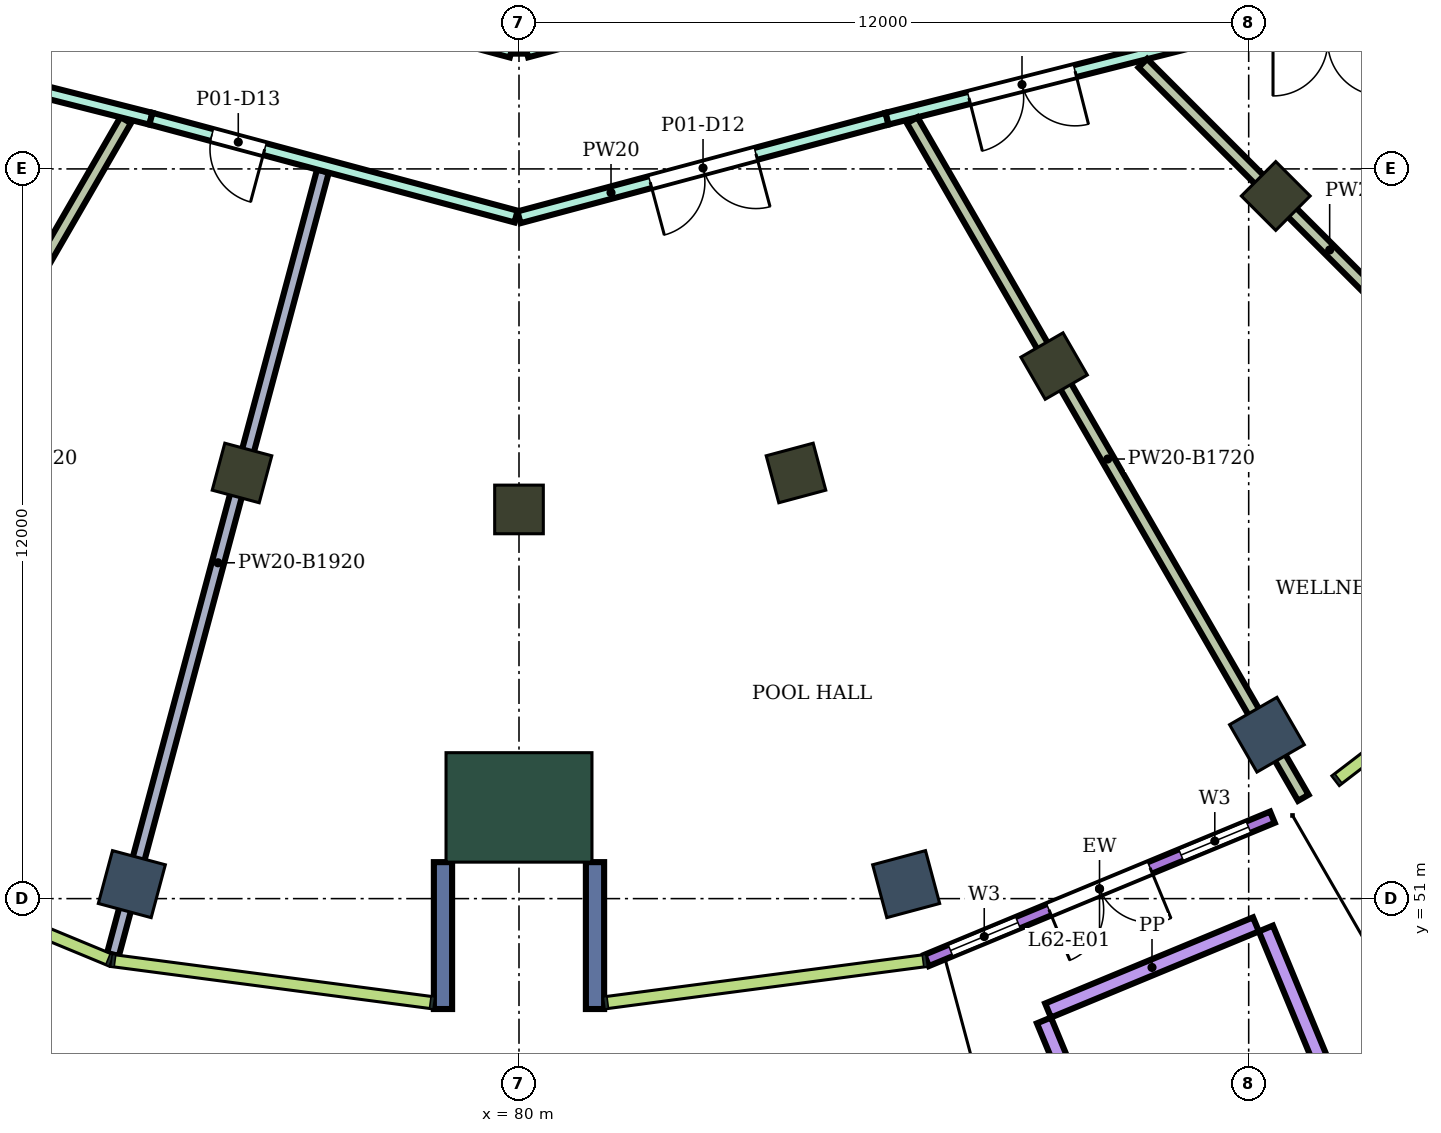
"""IFC4 building model, lengths in metres.
Left out: names, types, materials, properties, quantities, classifications, styles, units other than length and angle.
Written with IfcOpenShell. Run it as: python <this file> out.ifc"""

import sys

from ifc_helpers import new_model, si_unit, direction, frame, frame_2d, origin, origin_2d, place, context, subcontext, project, spatial, rectangle, extrude, element, fill, save


model = new_model("IFC4")
c1 = context("Model", 3, precision=1e-05, world=origin(), true_north=direction((0.0, 1.0)))
c2 = subcontext(c1, "Body", "Model", "MODEL_VIEW")
j1 = project(units=[si_unit("LENGTHUNIT", "METRE"), si_unit("PLANEANGLEUNIT", "RADIAN")], contexts=[c1])
p1 = place(None, origin())
s1 = spatial("IfcSite", under=j1, at=p1, CompositionType="ELEMENT")
p2 = place(p1, origin())
s2 = spatial("IfcBuilding", under=s1, at=p2, CompositionType="ELEMENT")
p3 = place(p2, frame((0.0, 0.0, 270.9)))
s3 = spatial("IfcBuildingStorey", under=s2, at=p3, CompositionType="ELEMENT", Elevation=270.9)
for number, where, z_axis, x_axis in (
    (1, (73.633, 51.238, 0.0), (0.0, 0.0, 1.0), (-0.259, -0.966, 0.0)),
    (2, (86.367, 51.238, 0.0), (0.0, 0.0, 1.0), (0.259, -0.966, 0.0)),
    (3, (92.3, 53.696, 0.0), (0.0, 0.0, 1.0), (0.5, -0.866, 0.0)),
):
    element("IfcColumn", number, at=place(p3, frame(where, z_axis=z_axis, x_axis=x_axis)), inside=s3, PredefinedType="COLUMN", context=c2, shape_type="SweptSolid", body=[
        extrude(rectangle(XDim=0.9, YDim=0.9, at=origin_2d()), origin(), (0.0, 0.0, 1.0), 4.8),
    ])
for number, where, z_axis, x_axis in (
    (4, (75.445, 58.0, 0.0), (0.0, 0.0, 1.0), (-0.259, -0.966, 0.0)),
    (5, (80.0, 57.4, 0.0), (0.0, 0.0, 1.0), (0.0, -1.0, 0.0)),
    (6, (84.555, 58.0, 0.0), (0.0, 0.0, 1.0), (0.259, -0.966, 0.0)),
    (7, (88.8, 59.758, 0.0), (0.0, 0.0, 1.0), (0.5, -0.866, 0.0)),
    (8, (92.445, 62.555, 0.0), (0.0, 0.0, 1.0), (0.707, -0.707, 0.0)),
):
    element("IfcColumn", number, at=place(p3, frame(where, z_axis=z_axis, x_axis=x_axis)), inside=s3, PredefinedType="COLUMN", context=c2, shape_type="SweptSolid", body=[
        extrude(rectangle(XDim=0.8, YDim=0.8, at=origin_2d()), origin(), (0.0, 0.0, 1.0), 4.8),
    ])
p4 = place(p3, frame((80.0, 52.5, 0.0), z_axis=(0.0, 0.0, 1.0), x_axis=(0.0, -1.0, 0.0)))
e9 = element("IfcColumn", 9, at=p4, inside=s3, PredefinedType="COLUMN", context=c2, shape_type="SweptSolid", body=[
    extrude(rectangle(XDim=1.8, YDim=2.4, at=origin_2d()), origin(), (0.0, 0.0, 1.0), 4.8),
])
p5 = place(p3, frame((86.703, 49.983, 0.0), z_axis=(0.0, 0.0, 1.0), x_axis=(0.923881003904, 0.382679880089, 0.0)))
e10 = element("IfcWall", 10, at=p5, inside=s3, PredefinedType="NOTDEFINED", context=c2, shape_type="SweptSolid", body=[
    extrude(rectangle(XDim=6.156, YDim=0.2, at=frame_2d((3.078, 0.0))), origin(), (0.0, 0.0, 1.0), 4.8),
])
p6 = place(p5, frame((0.426, 0.0, 0.9)))
e11 = element("IfcOpeningElement", 11, at=p6, cuts=e10, PredefinedType="OPENING", context=c2, shape_type="SweptSolid", body=[
    extrude(rectangle(XDim=1.2, YDim=2.4, at=frame_2d((0.6, 1.2))), frame((0.0, 0.11, 0.0), z_axis=(0.0, -1.0, 0.0), x_axis=(1.0, 0.0, 0.0)), (0.0, 0.0, 1.0), 0.22),
])
p7 = place(p5, frame((2.178, 0.0, 0.0)))
e12 = element("IfcOpeningElement", 12, at=p7, cuts=e10, PredefinedType="OPENING", context=c2, shape_type="SweptSolid", body=[
    extrude(rectangle(XDim=1.8, YDim=2.4, at=frame_2d((0.9, 1.2))), frame((0.0, 0.11, 0.0), z_axis=(0.0, -1.0, 0.0), x_axis=(1.0, 0.0, 0.0)), (0.0, 0.0, 1.0), 0.22),
])
p8 = place(p5, frame((4.53, 0.0, 0.9)))
e13 = element("IfcOpeningElement", 13, at=p8, cuts=e10, PredefinedType="OPENING", context=c2, shape_type="SweptSolid", body=[
    extrude(rectangle(XDim=1.2, YDim=2.4, at=frame_2d((0.6, 1.2))), frame((0.0, 0.11, 0.0), z_axis=(0.0, -1.0, 0.0), x_axis=(1.0, 0.0, 0.0)), (0.0, 0.0, 1.0), 0.22),
])
for number, where, z_axis, x_axis in (
    (14, (78.75, 51.6, 0.0), (0.0, 0.0, 1.0), (0.0, -1.0, 0.0)),
    (15, (81.25, 51.6, 0.0), (0.0, 0.0, 1.0), (0.0, -1.0, 0.0)),
):
    element("IfcWall", number, at=place(p3, frame(where, z_axis=z_axis, x_axis=x_axis)), inside=s3, PredefinedType="NOTDEFINED", context=c2, shape_type="SweptSolid", body=[
        extrude(rectangle(XDim=2.416, YDim=0.3, at=frame_2d((1.208, 0.0))), origin(), (0.0, 0.0, 1.0), 4.8),
    ])
p9 = place(p3, frame((88.701, 49.16, 0.25), z_axis=(0.0, 0.0, 1.0), x_axis=(0.923875293758, 0.382693665462, 0.0)))
e16 = element("IfcWall", 16, at=p9, inside=s3, PredefinedType="USERDEFINED", context=c2, shape_type="SweptSolid", body=[
    extrude(rectangle(XDim=3.7, YDim=0.25, at=frame_2d((1.85, 0.0))), origin(), (0.0, 0.0, 1.0), 0.95),
])
p10 = place(p3, frame((92.282, 50.508, 0.25), z_axis=(0.0, 0.0, 1.0), x_axis=(0.382728600334, -0.923860822032, 0.0)))
e17 = element("IfcWall", 17, at=p10, inside=s3, PredefinedType="USERDEFINED", context=c2, shape_type="SweptSolid", body=[
    extrude(rectangle(XDim=3.3, YDim=0.25, at=frame_2d((1.65, 0.0))), origin(), (0.0, 0.0, 1.0), 0.95),
])
p11 = place(p3, frame((89.896, 45.948, 0.25), z_axis=(0.0, 0.0, 1.0), x_axis=(-0.382702441477, 0.92387165845, 0.0)))
e18 = element("IfcWall", 18, at=p11, inside=s3, PredefinedType="USERDEFINED", context=c2, shape_type="SweptSolid", body=[
    extrude(rectangle(XDim=3.3, YDim=0.25, at=frame_2d((1.65, 0.0))), origin(), (0.0, 0.0, 1.0), 0.95),
])
p12 = place(p3, frame((67.097, 52.661, 0.0), z_axis=(0.0, 0.0, 1.0), x_axis=(0.500128690501, 0.865951091539, 0.0)))
e19 = element("IfcWall", 19, at=p12, inside=s3, PredefinedType="PARTITIONING", context=c2, shape_type="SweptSolid", body=[
    extrude(rectangle(XDim=12.866, YDim=0.2, at=frame_2d((6.433, 0.0))), origin(), (0.0, 0.0, 1.0), 3.08),
])
p13 = place(p3, frame((68.201, 65.28, 0.0), z_axis=(0.0, 0.0, 1.0), x_axis=(0.969376914413, -0.245577681811, 0.0)))
e20 = element("IfcWall", 20, at=p13, inside=s3, PredefinedType="PARTITIONING", context=c2, shape_type="SweptSolid", body=[
    extrude(rectangle(XDim=5.927, YDim=0.2, at=frame_2d((2.963, 0.0))), origin(), (0.0, 0.0, 1.0), 4.35),
])
p14 = place(p13, frame((3.188, 0.0, 0.0)))
e21 = element("IfcOpeningElement", 21, at=p14, cuts=e20, PredefinedType="OPENING", context=c2, shape_type="SweptSolid", body=[
    extrude(rectangle(XDim=0.9, YDim=2.1, at=frame_2d((0.45, 1.05))), frame((0.0, 0.11, 0.0), z_axis=(0.0, -1.0, 0.0), x_axis=(1.0, 0.0, 0.0)), (0.0, 0.0, 1.0), 0.22),
])
p15 = place(p3, frame((73.323, 50.082, 0.0), z_axis=(0.0, 0.0, 1.0), x_axis=(0.25885533734, 0.965916101083, 0.0)))
e22 = element("IfcWall", 22, at=p15, inside=s3, PredefinedType="PARTITIONING", context=c2, shape_type="SweptSolid", body=[
    extrude(rectangle(XDim=13.337, YDim=0.2, at=frame_2d((6.668, 0.0))), origin(), (0.0, 0.0, 1.0), 2.88),
])
p16 = place(p3, frame((73.947, 63.826, 0.0), z_axis=(0.0, 0.0, 1.0), x_axis=(0.965898432367, -0.258921258979, 0.0)))
e23 = element("IfcWall", 23, at=p16, inside=s3, PredefinedType="PARTITIONING", context=c2, shape_type="SweptSolid", body=[
    extrude(rectangle(XDim=6.217, YDim=0.2, at=frame_2d((3.108, 0.0))), origin(), (0.0, 0.0, 1.0), 4.35),
])
p17 = place(p16, frame((1.037, 0.0, 0.0)))
e24 = element("IfcOpeningElement", 24, at=p17, cuts=e23, PredefinedType="OPENING", context=c2, shape_type="SweptSolid", body=[
    extrude(rectangle(XDim=0.9, YDim=2.1, at=frame_2d((0.45, 1.05))), frame((0.0, 0.11, 0.0), z_axis=(0.0, -1.0, 0.0), x_axis=(1.0, 0.0, 0.0)), (0.0, 0.0, 1.0), 0.22),
])
p18 = place(p3, frame((74.603, 66.342, 0.0), z_axis=(0.0, 0.0, 1.0), x_axis=(0.965920893652, -0.258837453254, 0.0)))
e25 = element("IfcWall", 25, at=p18, inside=s3, PredefinedType="PARTITIONING", context=c2, shape_type="SweptSolid", body=[
    extrude(rectangle(XDim=5.458, YDim=0.2, at=frame_2d((2.729, 0.0))), origin(), (0.0, 0.0, 1.0), 4.35),
])
p19 = place(p18, frame((2.512, 0.0, 0.0)))
e26 = element("IfcOpeningElement", 26, at=p19, cuts=e25, PredefinedType="OPENING", context=c2, shape_type="SweptSolid", body=[
    extrude(rectangle(XDim=0.9, YDim=2.1, at=frame_2d((0.45, 1.05))), frame((0.0, 0.11, 0.0), z_axis=(0.0, -1.0, 0.0), x_axis=(1.0, 0.0, 0.0)), (0.0, 0.0, 1.0), 0.22),
])
p20 = place(p3, frame((80.125, 64.932, 0.0), z_axis=(0.0, 0.0, 1.0), x_axis=(0.966236955806, 0.257655089674, 0.0)))
e27 = element("IfcWall", 27, at=p20, inside=s3, PredefinedType="PARTITIONING", context=c2, shape_type="SweptSolid", body=[
    extrude(rectangle(XDim=8.039, YDim=0.2, at=frame_2d((4.02, 0.0))), origin(), (0.0, 0.0, 1.0), 4.35),
])
p21 = place(p20, frame((6.298, 0.0, 0.0)))
e28 = element("IfcOpeningElement", 28, at=p21, cuts=e27, PredefinedType="OPENING", context=c2, shape_type="SweptSolid", body=[
    extrude(rectangle(XDim=0.9, YDim=2.1, at=frame_2d((0.45, 1.05))), frame((0.0, 0.11, 0.0), z_axis=(0.0, -1.0, 0.0), x_axis=(1.0, 0.0, 0.0)), (0.0, 0.0, 1.0), 0.22),
])
p22 = place(p20, frame((2.045, 0.0, 0.0)))
e29 = element("IfcOpeningElement", 29, at=p22, cuts=e27, PredefinedType="OPENING", context=c2, shape_type="SweptSolid", body=[
    extrude(rectangle(XDim=0.9, YDim=2.1, at=frame_2d((0.45, 1.05))), frame((0.0, 0.11, 0.0), z_axis=(0.0, -1.0, 0.0), x_axis=(1.0, 0.0, 0.0)), (0.0, 0.0, 1.0), 0.22),
])
p23 = place(p3, frame((80.0, 62.204, 0.0), z_axis=(0.0, 0.0, 1.0), x_axis=(0.965938139786, 0.258773086132, 0.0)))
e30 = element("IfcWall", 30, at=p23, inside=s3, PredefinedType="PARTITIONING", context=c2, shape_type="SweptSolid", body=[
    extrude(rectangle(XDim=6.266, YDim=0.2, at=frame_2d((3.133, 0.0))), origin(), (0.0, 0.0, 1.0), 4.35),
])
p24 = place(p23, frame((2.233, 0.0, 0.0)))
e31 = element("IfcOpeningElement", 31, at=p24, cuts=e30, PredefinedType="OPENING", context=c2, shape_type="SweptSolid", body=[
    extrude(rectangle(XDim=1.8, YDim=2.1, at=frame_2d((0.9, 1.05))), frame((0.0, 0.11, 0.0), z_axis=(0.0, -1.0, 0.0), x_axis=(1.0, 0.0, 0.0)), (0.0, 0.0, 1.0), 0.22),
])
p25 = place(p3, frame((80.0, 64.896, 0.0), z_axis=(0.0, 0.0, 1.0), x_axis=(0.0, 1.0, 0.0)))
e32 = element("IfcWall", 32, at=p25, inside=s3, PredefinedType="PARTITIONING", context=c2, shape_type="SweptSolid", body=[
    extrude(rectangle(XDim=2.405, YDim=0.2, at=frame_2d((1.203, 0.0))), origin(), (0.0, 0.0, 1.0), 3.08),
])
p26 = place(p3, frame((86.053, 63.826, 0.0), z_axis=(0.0, 0.0, 1.0), x_axis=(0.969450593176, 0.245286663704, 0.0)))
e33 = element("IfcWall", 33, at=p26, inside=s3, PredefinedType="PARTITIONING", context=c2, shape_type="SweptSolid", body=[
    extrude(rectangle(XDim=5.907, YDim=0.2, at=frame_2d((2.954, 0.0))), origin(), (0.0, 0.0, 1.0), 4.35),
])
p27 = place(p26, frame((1.389, 0.0, 0.0)))
e34 = element("IfcOpeningElement", 34, at=p27, cuts=e33, PredefinedType="OPENING", context=c2, shape_type="SweptSolid", body=[
    extrude(rectangle(XDim=1.8, YDim=2.1, at=frame_2d((0.9, 1.05))), frame((0.0, 0.11, 0.0), z_axis=(0.0, -1.0, 0.0), x_axis=(1.0, 0.0, 0.0)), (0.0, 0.0, 1.0), 0.22),
])
p28 = place(p3, frame((86.466, 63.8, 0.0), z_axis=(0.0, 0.0, 1.0), x_axis=(0.499941480581, -0.866059187351, 0.0)))
e35 = element("IfcWall", 35, at=p28, inside=s3, PredefinedType="PARTITIONING", context=c2, shape_type="SweptSolid", body=[
    extrude(rectangle(XDim=12.865, YDim=0.2, at=frame_2d((6.433, 0.0))), origin(), (0.0, 0.0, 1.0), 3.08),
])
p29 = place(p3, frame((90.26, 64.739, 0.0), z_axis=(0.0, 0.0, 1.0), x_axis=(0.707050588015, -0.707162969893, 0.0)))
e36 = element("IfcWall", 36, at=p29, inside=s3, PredefinedType="PARTITIONING", context=c2, shape_type="SweptSolid", body=[
    extrude(rectangle(XDim=8.69, YDim=0.2, at=frame_2d((4.345, 0.0))), origin(), (0.0, 0.0, 1.0), 3.08),
])
p30 = place(p6, origin())
e37 = element("IfcWindow", 37, at=p30, inside=s3, PartitioningType="SINGLE_PANEL", PredefinedType="WINDOW", context=c2, shape_type="SweptSolid", body=[
    extrude(rectangle(XDim=1.2, YDim=2.4, at=frame_2d((0.6, 1.2))), frame((0.0, 0.03, 0.0), z_axis=(0.0, -1.0, 0.0), x_axis=(1.0, 0.0, 0.0)), (0.0, 0.0, 1.0), 0.06),
])
fill(e11, e37)
p31 = place(p7, frame((1.8, 0.0, 0.0), z_axis=(0.0, 0.0, 1.0), x_axis=(-1.0, 0.0, 0.0)))
e38 = element("IfcDoor", 38, at=p31, inside=s3, OperationType="DOUBLE_DOOR_SINGLE_SWING", PredefinedType="DOOR", context=c2, shape_type="SweptSolid", body=[
    extrude(rectangle(XDim=1.8, YDim=2.4, at=frame_2d((0.9, 1.2))), frame((0.0, 0.025, 0.0), z_axis=(0.0, -1.0, 0.0), x_axis=(1.0, 0.0, 0.0)), (0.0, 0.0, 1.0), 0.05),
])
fill(e12, e38)
p32 = place(p8, origin())
e39 = element("IfcWindow", 39, at=p32, inside=s3, PartitioningType="SINGLE_PANEL", PredefinedType="WINDOW", context=c2, shape_type="SweptSolid", body=[
    extrude(rectangle(XDim=1.2, YDim=2.4, at=frame_2d((0.6, 1.2))), frame((0.0, 0.03, 0.0), z_axis=(0.0, -1.0, 0.0), x_axis=(1.0, 0.0, 0.0)), (0.0, 0.0, 1.0), 0.06),
])
fill(e13, e39)
p33 = place(p27, frame((1.8, 0.0, 0.0), z_axis=(0.0, 0.0, 1.0), x_axis=(-1.0, 0.0, 0.0)))
e40 = element("IfcDoor", 40, at=p33, inside=s3, OperationType="DOUBLE_DOOR_SINGLE_SWING", PredefinedType="DOOR", context=c2, shape_type="SweptSolid", body=[
    extrude(rectangle(XDim=1.8, YDim=2.1, at=frame_2d((0.9, 1.05))), frame((0.0, 0.025, 0.0), z_axis=(0.0, -1.0, 0.0), x_axis=(1.0, 0.0, 0.0)), (0.0, 0.0, 1.0), 0.05),
])
fill(e34, e40)
p34 = place(p24, frame((1.8, 0.0, 0.0), z_axis=(0.0, 0.0, 1.0), x_axis=(-1.0, 0.0, 0.0)))
e41 = element("IfcDoor", 41, at=p34, inside=s3, OperationType="DOUBLE_DOOR_SINGLE_SWING", PredefinedType="DOOR", context=c2, shape_type="SweptSolid", body=[
    extrude(rectangle(XDim=1.8, YDim=2.1, at=frame_2d((0.9, 1.05))), frame((0.0, 0.025, 0.0), z_axis=(0.0, -1.0, 0.0), x_axis=(1.0, 0.0, 0.0)), (0.0, 0.0, 1.0), 0.05),
])
fill(e31, e41)
p35 = place(p17, frame((0.9, 0.0, 0.0), z_axis=(0.0, 0.0, 1.0), x_axis=(-1.0, 0.0, 0.0)))
e42 = element("IfcDoor", 42, at=p35, inside=s3, OperationType="SINGLE_SWING_LEFT", PredefinedType="DOOR", context=c2, shape_type="SweptSolid", body=[
    extrude(rectangle(XDim=0.9, YDim=2.1, at=frame_2d((0.45, 1.05))), frame((0.0, 0.025, 0.0), z_axis=(0.0, -1.0, 0.0), x_axis=(1.0, 0.0, 0.0)), (0.0, 0.0, 1.0), 0.05),
])
fill(e24, e42)
save(model, sys.argv[1])
